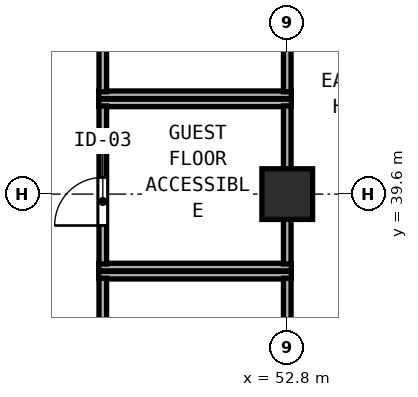
"""IFC4 building model, lengths in metres.
Left out: names, types, materials, properties, quantities, classifications, styles, units other than length and angle.
Written with IfcOpenShell. Run it as: python <this file> out.ifc"""

import sys

from ifc_helpers import new_model, si_unit, direction, frame, frame_2d, origin, origin_2d, place, context, subcontext, project, spatial, rectangle, hollow_rectangle, extrude, element, fill, save


model = new_model("IFC4")
c1 = context("Model", 3, precision=1e-05, world=origin(), true_north=direction((0.0, 1.0)))
c2 = subcontext(c1, "Body", "Model", "MODEL_VIEW")
j1 = project(units=[si_unit("LENGTHUNIT", "METRE"), si_unit("PLANEANGLEUNIT", "RADIAN")], contexts=[c1])
p1 = place(None, origin())
s1 = spatial("IfcSite", under=j1, at=p1, CompositionType="ELEMENT")
p2 = place(p1, origin())
s2 = spatial("IfcBuilding", under=s1, at=p2, CompositionType="ELEMENT")
p3 = place(p2, frame((0.0, 0.0, 78.0)))
s3 = spatial("IfcBuildingStorey", under=s2, at=p3, CompositionType="ELEMENT", Elevation=78.0)
p4 = place(p3, frame((52.8, 39.6, 0.0), z_axis=(0.0, 0.0, 1.0), x_axis=(1.0, 0.0, 0.0)))
e1 = element("IfcColumn", 1, at=p4, inside=s3, PredefinedType="COLUMN", context=c2, shape_type="SweptSolid", body=[
    extrude(hollow_rectangle(XDim=1.0, YDim=1.0, WallThickness=0.038, at=origin_2d()), origin(), (0.0, 0.0, 1.0), 3.8),
])
p5 = place(p3, frame((58.145, 42.492, 0.0), z_axis=(0.0, 0.0, 1.0), x_axis=(-0.948683298051, 0.316227766017, 0.0)))
e2 = element("IfcWall", 2, at=p5, inside=s3, PredefinedType="SOLIDWALL", context=c2, shape_type="SweptSolid", body=[
    extrude(rectangle(XDim=5.675, YDim=0.24, at=frame_2d((2.838, 0.0))), origin(), (0.0, 0.0, 1.0), 3.097),
])
p6 = place(p5, frame((1.6, 0.0, 0.85)))
e3 = element("IfcOpeningElement", 3, at=p6, cuts=e2, PredefinedType="OPENING", context=c2, shape_type="SweptSolid", body=[
    extrude(rectangle(XDim=1.2, YDim=1.85, at=frame_2d((0.6, 0.925))), frame((0.0, 0.13, 0.0), z_axis=(0.0, -1.0, 0.0), x_axis=(1.0, 0.0, 0.0)), (0.0, 0.0, 1.0), 0.26),
])
p7 = place(p3, frame((49.08, 38.0, 0.0), z_axis=(0.0, 0.0, 1.0), x_axis=(1.0, 0.0, 0.0)))
e4 = element("IfcWall", 4, at=p7, inside=s3, PredefinedType="PARTITIONING", context=c2, shape_type="SweptSolid", body=[
    extrude(rectangle(XDim=3.8, YDim=0.15, at=frame_2d((1.9, 0.0))), origin(), (0.0, 0.0, 1.0), 3.6),
])
p8 = place(p3, frame((49.16, 33.06, 0.0), z_axis=(0.0, 0.0, 1.0), x_axis=(0.0, 1.0, 0.0)))
e5 = element("IfcWall", 5, at=p8, inside=s3, PredefinedType="PARTITIONING", context=c2, shape_type="SweptSolid", body=[
    extrude(rectangle(XDim=4.88, YDim=0.15, at=frame_2d((2.44, 0.0))), origin(), (0.0, 0.0, 1.0), 3.6),
])
p9 = place(p8, frame((1.36, 0.0, 0.0)))
e6 = element("IfcOpeningElement", 6, at=p9, cuts=e5, PredefinedType="OPENING", context=c2, shape_type="SweptSolid", body=[
    extrude(rectangle(XDim=0.95, YDim=2.12, at=frame_2d((0.475, 1.06))), frame((0.0, 0.085, 0.0), z_axis=(0.0, -1.0, 0.0), x_axis=(1.0, 0.0, 0.0)), (0.0, 0.0, 1.0), 0.17),
])
p10 = place(p3, frame((52.8, 33.06, 0.0), z_axis=(0.0, 0.0, 1.0), x_axis=(0.0, 1.0, 0.0)))
e7 = element("IfcWall", 7, at=p10, inside=s3, PredefinedType="PARTITIONING", context=c2, shape_type="SweptSolid", body=[
    extrude(rectangle(XDim=4.88, YDim=0.15, at=frame_2d((2.44, 0.0))), origin(), (0.0, 0.0, 1.0), 3.097),
])
for number, where, z_axis, x_axis in (
    (8, (49.08, 41.4, 0.0), (0.0, 0.0, 1.0), (1.0, 0.0, 0.0)),
    (9, (49.08, 38.16, 0.0), (0.0, 0.0, 1.0), (1.0, 0.0, 0.0)),
):
    element("IfcWall", number, at=place(p3, frame(where, z_axis=z_axis, x_axis=x_axis)), inside=s3, PredefinedType="PARTITIONING", context=c2, shape_type="SweptSolid", body=[
        extrude(rectangle(XDim=3.8, YDim=0.15, at=frame_2d((1.9, 0.0))), origin(), (0.0, 0.0, 1.0), 3.6),
    ])
p11 = place(p3, frame((49.16, 38.22, 0.0), z_axis=(0.0, 0.0, 1.0), x_axis=(0.0, 1.0, 0.0)))
e10 = element("IfcWall", 10, at=p11, inside=s3, PredefinedType="PARTITIONING", context=c2, shape_type="SweptSolid", body=[
    extrude(rectangle(XDim=3.12, YDim=0.15, at=frame_2d((1.56, 0.0))), origin(), (0.0, 0.0, 1.0), 3.6),
])
p12 = place(p11, frame((0.76, 0.0, 0.0)))
e11 = element("IfcOpeningElement", 11, at=p12, cuts=e10, PredefinedType="OPENING", context=c2, shape_type="SweptSolid", body=[
    extrude(rectangle(XDim=0.95, YDim=2.12, at=frame_2d((0.475, 1.06))), frame((0.0, 0.085, 0.0), z_axis=(0.0, -1.0, 0.0), x_axis=(1.0, 0.0, 0.0)), (0.0, 0.0, 1.0), 0.17),
])
p13 = place(p3, frame((52.8, 38.22, 0.0), z_axis=(0.0, 0.0, 1.0), x_axis=(0.0, 1.0, 0.0)))
e12 = element("IfcWall", 12, at=p13, inside=s3, PredefinedType="PARTITIONING", context=c2, shape_type="SweptSolid", body=[
    extrude(rectangle(XDim=3.12, YDim=0.15, at=frame_2d((1.56, 0.0))), origin(), (0.0, 0.0, 1.0), 3.097),
])
p14 = place(p3, frame((49.08, 41.56, 0.0), z_axis=(0.0, 0.0, 1.0), x_axis=(1.0, 0.0, 0.0)))
e13 = element("IfcWall", 13, at=p14, inside=s3, PredefinedType="PARTITIONING", context=c2, shape_type="SweptSolid", body=[
    extrude(rectangle(XDim=3.8, YDim=0.15, at=frame_2d((1.9, 0.0))), origin(), (0.0, 0.0, 1.0), 3.6),
])
p15 = place(p3, frame((49.16, 41.62, 0.0), z_axis=(0.0, 0.0, 1.0), x_axis=(0.0, 1.0, 0.0)))
e14 = element("IfcWall", 14, at=p15, inside=s3, PredefinedType="PARTITIONING", context=c2, shape_type="SweptSolid", body=[
    extrude(rectangle(XDim=4.34, YDim=0.15, at=frame_2d((2.17, 0.0))), origin(), (0.0, 0.0, 1.0), 3.6),
])
p16 = place(p15, frame((1.16, 0.0, 0.0)))
e15 = element("IfcOpeningElement", 15, at=p16, cuts=e14, PredefinedType="OPENING", context=c2, shape_type="SweptSolid", body=[
    extrude(rectangle(XDim=0.95, YDim=2.12, at=frame_2d((0.475, 1.06))), frame((0.0, 0.085, 0.0), z_axis=(0.0, -1.0, 0.0), x_axis=(1.0, 0.0, 0.0)), (0.0, 0.0, 1.0), 0.17),
])
p17 = place(p3, frame((52.8, 41.62, 0.0), z_axis=(0.0, 0.0, 1.0), x_axis=(0.0, 1.0, 0.0)))
e16 = element("IfcWall", 16, at=p17, inside=s3, PredefinedType="PARTITIONING", context=c2, shape_type="SweptSolid", body=[
    extrude(rectangle(XDim=2.543, YDim=0.15, at=frame_2d((1.271, 0.0))), origin(), (0.0, 0.0, 1.0), 3.097),
])
p18 = place(p12, origin())
e17 = element("IfcDoor", 17, at=p18, inside=s3, OperationType="SINGLE_SWING_LEFT", PredefinedType="DOOR", context=c2, shape_type="SweptSolid", body=[
    extrude(rectangle(XDim=0.95, YDim=2.12, at=frame_2d((0.475, 1.06))), frame((0.0, 0.025, 0.0), z_axis=(0.0, -1.0, 0.0), x_axis=(1.0, 0.0, 0.0)), (0.0, 0.0, 1.0), 0.05),
])
fill(e11, e17)
save(model, sys.argv[1])
